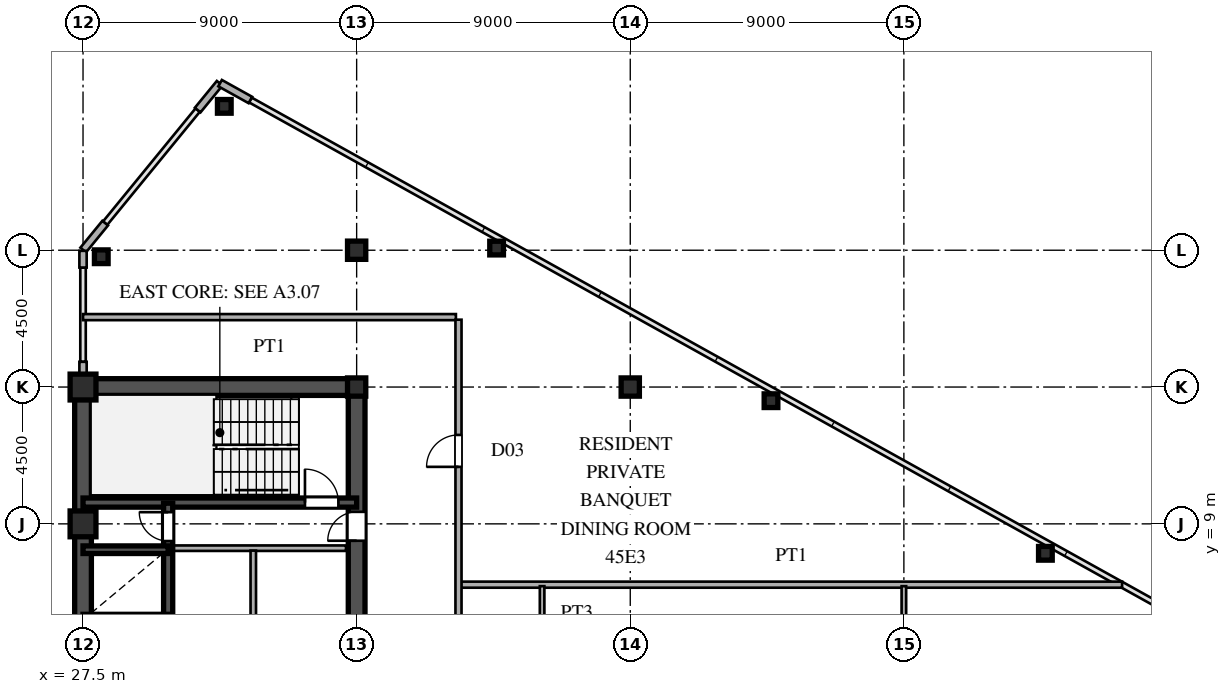
"""IFC4 building model, lengths in metres.
Left out: names, types, materials, properties, quantities, classifications, styles, units other than length and angle.
Written with IfcOpenShell. Run it as: python <this file> out.ifc"""

import sys

from ifc_helpers import new_model, si_unit, direction, frame, frame_2d, origin, origin_2d, place, context, subcontext, project, spatial, rectangle, hollow_rectangle, i_section, extrude, source, transform, mapped, element, fill, save


model = new_model("IFC4")
c1 = context("Model", 3, precision=1e-05, world=origin(), true_north=direction((0.0, 1.0)))
c2 = subcontext(c1, "Body", "Model", "MODEL_VIEW")
j1 = project(units=[si_unit("LENGTHUNIT", "METRE"), si_unit("PLANEANGLEUNIT", "RADIAN")], contexts=[c1])
p1 = place(None, origin())
s1 = spatial("IfcSite", under=j1, at=p1, CompositionType="ELEMENT")
p2 = place(p1, origin())
s2 = spatial("IfcBuilding", under=s1, at=p2, CompositionType="ELEMENT")
p3 = place(p2, frame((0.0, 0.0, 170.7)))
s3 = spatial("IfcBuildingStorey", under=s2, at=p3, CompositionType="ELEMENT", Elevation=170.7)
m1 = source(origin(), c2, "Body", "SweptSolid", [
    extrude(hollow_rectangle(XDim=0.85, YDim=0.85, WallThickness=0.036, at=origin_2d()), origin(), (0.0, 0.0, 1.0), 3.6),
])
for number, where, z_axis, x_axis in (
    (1, (27.5, 9.0, 0.0), (0.0, 0.0, 1.0), (1.0, 0.0, 0.0)),
    (2, (27.5, 13.5, 0.0), (0.0, 0.0, 1.0), (1.0, 0.0, 0.0)),
):
    element("IfcColumn", number, at=place(p3, frame(where, z_axis=z_axis, x_axis=x_axis)), inside=s3, PredefinedType="COLUMN", context=c2, shape_type="MappedRepresentation", body=[
        mapped(m1, transform((0.0, 0.0, 0.0), scale=1.0)),
    ])
m2 = source(origin(), c2, "Body", "SweptSolid", [
    extrude(i_section(OverallWidth=0.6, OverallDepth=0.6, WebThickness=0.025, FlangeThickness=0.04, at=origin_2d()), origin(), (0.0, 0.0, 1.0), 3.6),
])
for number, where, z_axis, x_axis in (
    (3, (36.5, 13.5, 0.0), (0.0, 0.0, 1.0), (1.0, 0.0, 0.0)),
    (4, (36.5, 18.0, 0.0), (0.0, 0.0, 1.0), (1.0, 0.0, 0.0)),
    (5, (45.5, 13.5, 0.0), (0.0, 0.0, 1.0), (1.0, 0.0, 0.0)),
):
    element("IfcColumn", number, at=place(p3, frame(where, z_axis=z_axis, x_axis=x_axis)), inside=s3, PredefinedType="COLUMN", context=c2, shape_type="MappedRepresentation", body=[
        mapped(m2, transform((0.0, 0.0, 0.0), scale=1.0)),
    ])
m3 = source(origin(), c2, "Body", "SweptSolid", [
    extrude(hollow_rectangle(XDim=0.45, YDim=0.45, WallThickness=0.018, at=origin_2d()), origin(), (0.0, 0.0, 1.0), 3.6),
])
for number, where, z_axis, x_axis in (
    (6, (32.147, 22.732, 0.0), (0.0, 0.0, 1.0), (1.0, 0.0, 0.0)),
    (7, (28.1, 17.786, 0.0), (0.0, 0.0, 1.0), (1.0, 0.0, 0.0)),
    (8, (41.104, 18.071, 0.0), (0.0, 0.0, 1.0), (1.0, 0.0, 0.0)),
    (9, (50.129, 13.051, 0.0), (0.0, 0.0, 1.0), (1.0, 0.0, 0.0)),
    (10, (59.155, 8.031, 0.0), (0.0, 0.0, 1.0), (1.0, 0.0, 0.0)),
):
    element("IfcColumn", number, at=place(p3, frame(where, z_axis=z_axis, x_axis=x_axis)), inside=s3, PredefinedType="COLUMN", context=c2, shape_type="MappedRepresentation", body=[
        mapped(m3, transform((0.0, 0.0, 0.0), scale=1.0)),
    ])
p4 = place(p3, frame((33.005, 22.941, 0.0), z_axis=(0.0, 0.0, 1.0), x_axis=(-0.87385402111, 0.486188389196, 0.0)))
e11 = element("IfcWall", 11, at=p4, inside=s3, PredefinedType="SOLIDWALL", context=c2, shape_type="SweptSolid", body=[
    extrude(rectangle(XDim=1.14, YDim=0.24, at=frame_2d((0.57, 0.0))), origin(), (0.0, 0.0, 1.0), 3.38),
])
for number, where, z_axis, x_axis in (
    (12, (31.994, 23.492, 0.0), (0.0, 0.0, 1.0), (-0.633, -0.774, 0.0)),
    (13, (28.228, 18.89, 0.0), (0.0, 0.0, 1.0), (-0.633, -0.774, 0.0)),
):
    element("IfcWall", number, at=place(p3, frame(where, z_axis=z_axis, x_axis=x_axis)), inside=s3, PredefinedType="SOLIDWALL", context=c2, shape_type="SweptSolid", body=[
        extrude(rectangle(XDim=1.14, YDim=0.24, at=frame_2d((0.57, 0.0))), origin(), (0.0, 0.0, 1.0), 3.38),
    ])
p5 = place(p3, frame((27.5, 13.78, 0.0), z_axis=(0.0, 0.0, 1.0), x_axis=(0.0, 1.0, 0.0)))
e14 = element("IfcWall", 14, at=p5, inside=s3, PredefinedType="SOLIDWALL", context=c2, shape_type="SweptSolid", body=[
    extrude(rectangle(XDim=0.55, YDim=0.24, at=frame_2d((0.275, 0.0))), origin(), (0.0, 0.0, 1.0), 2.88),
])
p6 = place(p3, frame((27.5, 17.43, 0.0), z_axis=(0.0, 0.0, 1.0), x_axis=(0.0, 1.0, 0.0)))
e15 = element("IfcWall", 15, at=p6, inside=s3, PredefinedType="SOLIDWALL", context=c2, shape_type="SweptSolid", body=[
    extrude(rectangle(XDim=0.55, YDim=0.24, at=frame_2d((0.275, 0.0))), origin(), (0.0, 0.0, 1.0), 3.38),
])
p7 = place(p3, frame((27.5, 1.3, 0.0), z_axis=(0.0, 0.0, 1.0), x_axis=(0.0, 1.0, 0.0)))
e16 = element("IfcWall", 16, at=p7, inside=s3, PredefinedType="SHEAR", context=c2, shape_type="SweptSolid", body=[
    extrude(rectangle(XDim=12.2, YDim=0.55, at=frame_2d((6.1, 0.0))), origin(), (0.0, 0.0, 1.0), 3.38),
])
p8 = place(p3, frame((27.5, 13.5, 0.0), z_axis=(0.0, 0.0, 1.0), x_axis=(1.0, 0.0, 0.0)))
e17 = element("IfcWall", 17, at=p8, inside=s3, PredefinedType="SHEAR", context=c2, shape_type="SweptSolid", body=[
    extrude(rectangle(XDim=9.0, YDim=0.55, at=frame_2d((4.5, 0.0))), origin(), (0.0, 0.0, 1.0), 3.38),
])
p9 = place(p3, frame((36.5, 8.2, 0.0), z_axis=(0.0, 0.0, 1.0), x_axis=(0.0, 1.0, 0.0)))
e18 = element("IfcWall", 18, at=p9, inside=s3, PredefinedType="SHEAR", context=c2, shape_type="SweptSolid", body=[
    extrude(rectangle(XDim=5.45, YDim=0.55, at=frame_2d((2.725, 0.0))), origin(), (0.0, 0.0, 1.0), 3.38),
])
p10 = place(p9, frame((0.245, 0.0, 0.0)))
e19 = element("IfcOpeningElement", 19, at=p10, cuts=e18, PredefinedType="OPENING", context=c2, shape_type="SweptSolid", body=[
    extrude(rectangle(XDim=0.95, YDim=2.15, at=frame_2d((0.475, 1.075))), frame((0.0, 0.285, 0.0), z_axis=(0.0, -1.0, 0.0), x_axis=(1.0, 0.0, 0.0)), (0.0, 0.0, 1.0), 0.57),
])
p11 = place(p3, frame((36.5, 1.3, 0.0), z_axis=(0.0, 0.0, 1.0), x_axis=(0.0, 1.0, 0.0)))
e20 = element("IfcWall", 20, at=p11, inside=s3, PredefinedType="SHEAR", context=c2, shape_type="SweptSolid", body=[
    extrude(rectangle(XDim=6.9, YDim=0.55, at=frame_2d((3.45, 0.0))), origin(), (0.0, 0.0, 1.0), 3.38),
])
p12 = place(p11, frame((2.975, 0.0, 0.0)))
e21 = element("IfcOpeningElement", 21, at=p12, cuts=e20, PredefinedType="OPENING", context=c2, shape_type="SweptSolid", body=[
    extrude(rectangle(XDim=0.95, YDim=2.15, at=frame_2d((0.475, 1.075))), frame((0.0, 0.285, 0.0), z_axis=(0.0, -1.0, 0.0), x_axis=(1.0, 0.0, 0.0)), (0.0, 0.0, 1.0), 0.57),
])
p13 = place(p3, frame((27.5, 9.7, 0.0), z_axis=(0.0, 0.0, 1.0), x_axis=(1.0, 0.0, 0.0)))
e22 = element("IfcWall", 22, at=p13, inside=s3, PredefinedType="SHEAR", context=c2, shape_type="SweptSolid", body=[
    extrude(rectangle(XDim=9.0, YDim=0.3, at=frame_2d((4.5, 0.0))), origin(), (0.0, 0.0, 1.0), 3.38),
])
p14 = place(p13, frame((7.3, 0.0, 0.0)))
e23 = element("IfcOpeningElement", 23, at=p14, cuts=e22, PredefinedType="OPENING", context=c2, shape_type="SweptSolid", body=[
    extrude(rectangle(XDim=1.1, YDim=2.2, at=frame_2d((0.55, 1.1))), frame((0.0, 0.16, 0.0), z_axis=(0.0, -1.0, 0.0), x_axis=(1.0, 0.0, 0.0)), (0.0, 0.0, 1.0), 0.32),
])
for number, where, z_axis, x_axis in (
    (24, (27.5, 5.9, 0.0), (0.0, 0.0, 1.0), (1.0, 0.0, 0.0)),
    (25, (27.5, 8.15, 0.0), (0.0, 0.0, 1.0), (1.0, 0.0, 0.0)),
):
    element("IfcWall", number, at=place(p3, frame(where, z_axis=z_axis, x_axis=x_axis)), inside=s3, PredefinedType="SHEAR", context=c2, shape_type="SweptSolid", body=[
        extrude(rectangle(XDim=2.8, YDim=0.25, at=frame_2d((1.4, 0.0))), origin(), (0.0, 0.0, 1.0), 3.38),
    ])
p15 = place(p3, frame((30.3, 5.9, 0.0), z_axis=(0.0, 0.0, 1.0), x_axis=(0.0, 1.0, 0.0)))
e26 = element("IfcWall", 26, at=p15, inside=s3, PredefinedType="SHEAR", context=c2, shape_type="SweptSolid", body=[
    extrude(rectangle(XDim=2.25, YDim=0.3, at=frame_2d((1.125, 0.0))), origin(), (0.0, 0.0, 1.0), 3.38),
])
p16 = place(p3, frame((30.3, 8.15, 0.0), z_axis=(0.0, 0.0, 1.0), x_axis=(0.0, 1.0, 0.0)))
e27 = element("IfcWall", 27, at=p16, inside=s3, PredefinedType="SHEAR", context=c2, shape_type="SweptSolid", body=[
    extrude(rectangle(XDim=1.53, YDim=0.3, at=frame_2d((0.765, 0.0))), origin(), (0.0, 0.0, 1.0), 3.38),
])
p17 = place(p16, frame((0.285, 0.0, 0.0)))
e28 = element("IfcOpeningElement", 28, at=p17, cuts=e27, PredefinedType="OPENING", context=c2, shape_type="SweptSolid", body=[
    extrude(rectangle(XDim=0.95, YDim=2.15, at=frame_2d((0.475, 1.075))), frame((0.0, 0.16, 0.0), z_axis=(0.0, -1.0, 0.0), x_axis=(1.0, 0.0, 0.0)), (0.0, 0.0, 1.0), 0.32),
])
p18 = place(p3, frame((30.45, 8.2, 0.0), z_axis=(0.0, 0.0, 1.0), x_axis=(1.0, 0.0, 0.0)))
e29 = element("IfcWall", 29, at=p18, inside=s3, PredefinedType="PARTITIONING", context=c2, shape_type="SweptSolid", body=[
    extrude(rectangle(XDim=5.7, YDim=0.18, at=frame_2d((2.85, 0.0))), origin(), (0.0, 0.0, 1.0), 3.38),
])
p19 = place(p3, frame((33.1, 1.38, 0.0), z_axis=(0.0, 0.0, 1.0), x_axis=(0.0, 1.0, 0.0)))
e30 = element("IfcWall", 30, at=p19, inside=s3, PredefinedType="PARTITIONING", context=c2, shape_type="SweptSolid", body=[
    extrude(rectangle(XDim=6.74, YDim=0.18, at=frame_2d((3.37, 0.0))), origin(), (0.0, 0.0, 1.0), 3.38),
])
p20 = place(p3, frame((39.93, 7.0, 0.0), z_axis=(0.0, 0.0, 1.0), x_axis=(1.0, 0.0, 0.0)))
e31 = element("IfcWall", 31, at=p20, inside=s3, PredefinedType="PARTITIONING", context=c2, shape_type="SweptSolid", body=[
    extrude(rectangle(XDim=21.748, YDim=0.2, at=frame_2d((10.874, 0.0))), origin(), (0.0, 0.0, 1.0), 3.38),
])
p21 = place(p3, frame((27.5, 15.8, 0.0), z_axis=(0.0, 0.0, 1.0), x_axis=(1.0, 0.0, 0.0)))
e32 = element("IfcWall", 32, at=p21, inside=s3, PredefinedType="PARTITIONING", context=c2, shape_type="SweptSolid", body=[
    extrude(rectangle(XDim=12.265, YDim=0.2, at=frame_2d((6.132, 0.0))), origin(), (0.0, 0.0, 1.0), 3.38),
])
p22 = place(p3, frame((39.85, -15.715, 0.0), z_axis=(0.0, 0.0, 1.0), x_axis=(0.0, 1.0, 0.0)))
e33 = element("IfcWall", 33, at=p22, inside=s3, PredefinedType="PARTITIONING", context=c2, shape_type="SweptSolid", body=[
    extrude(rectangle(XDim=31.43, YDim=0.2, at=frame_2d((15.715, 0.0))), origin(), (0.0, 0.0, 1.0), 3.38),
])
p23 = place(p22, frame((6.792, 0.0, 0.0)))
e34 = element("IfcOpeningElement", 34, at=p23, cuts=e33, PredefinedType="OPENING", context=c2, shape_type="SweptSolid", body=[
    extrude(rectangle(XDim=1.05, YDim=2.25, at=frame_2d((0.525, 1.125))), frame((0.0, 0.11, 0.0), z_axis=(0.0, -1.0, 0.0), x_axis=(1.0, 0.0, 0.0)), (0.0, 0.0, 1.0), 0.22),
])
p24 = place(p22, frame((14.98, 0.0, 0.0)))
e35 = element("IfcOpeningElement", 35, at=p24, cuts=e33, PredefinedType="OPENING", context=c2, shape_type="SweptSolid", body=[
    extrude(rectangle(XDim=1.05, YDim=2.25, at=frame_2d((0.525, 1.125))), frame((0.0, 0.11, 0.0), z_axis=(0.0, -1.0, 0.0), x_axis=(1.0, 0.0, 0.0)), (0.0, 0.0, 1.0), 0.22),
])
p25 = place(p22, frame((26.59, 0.0, 0.0)))
e36 = element("IfcOpeningElement", 36, at=p25, cuts=e33, PredefinedType="OPENING", context=c2, shape_type="SweptSolid", body=[
    extrude(rectangle(XDim=1.05, YDim=2.25, at=frame_2d((0.525, 1.125))), frame((0.0, 0.11, 0.0), z_axis=(0.0, -1.0, 0.0), x_axis=(1.0, 0.0, 0.0)), (0.0, 0.0, 1.0), 0.22),
])
p26 = place(p3, frame((42.6, 2.852, 0.0), z_axis=(0.0, 0.0, 1.0), x_axis=(0.0, 1.0, 0.0)))
e37 = element("IfcWall", 37, at=p26, inside=s3, PredefinedType="PARTITIONING", context=c2, shape_type="SweptSolid", body=[
    extrude(rectangle(XDim=4.098, YDim=0.15, at=frame_2d((2.049, 0.0))), origin(), (0.0, 0.0, 1.0), 3.38),
])
p27 = place(p3, frame((54.5, -10.485, 0.0), z_axis=(0.0, 0.0, 1.0), x_axis=(0.0, 1.0, 0.0)))
e38 = element("IfcWall", 38, at=p27, inside=s3, PredefinedType="PARTITIONING", context=c2, shape_type="SweptSolid", body=[
    extrude(rectangle(XDim=17.435, YDim=0.15, at=frame_2d((8.718, 0.0))), origin(), (0.0, 0.0, 1.0), 2.78),
])
p28 = place(p27, frame((1.242, 0.0, 0.0)))
e39 = element("IfcOpeningElement", 39, at=p28, cuts=e38, PredefinedType="OPENING", context=c2, shape_type="SweptSolid", body=[
    extrude(rectangle(XDim=0.95, YDim=2.15, at=frame_2d((0.475, 1.075))), frame((0.0, 0.085, 0.0), z_axis=(0.0, -1.0, 0.0), x_axis=(1.0, 0.0, 0.0)), (0.0, 0.0, 1.0), 0.17),
])
p29 = place(p27, frame((10.01, 0.0, 0.0)))
e40 = element("IfcOpeningElement", 40, at=p29, cuts=e38, PredefinedType="OPENING", context=c2, shape_type="SweptSolid", body=[
    extrude(rectangle(XDim=0.95, YDim=2.15, at=frame_2d((0.475, 1.075))), frame((0.0, 0.085, 0.0), z_axis=(0.0, -1.0, 0.0), x_axis=(1.0, 0.0, 0.0)), (0.0, 0.0, 1.0), 0.17),
])
m4 = source(origin(), c2, "Body", "SweptSolid", [
    extrude(rectangle(XDim=0.95, YDim=2.15, at=frame_2d((0.475, 1.075))), frame((0.0, 0.025, 0.0), z_axis=(0.0, -1.0, 0.0), x_axis=(1.0, 0.0, 0.0)), (0.0, 0.0, 1.0), 0.05),
])
p30 = place(p10, origin())
e41 = element("IfcDoor", 41, at=p30, inside=s3, OperationType="SINGLE_SWING_LEFT", PredefinedType="DOOR", context=c2, shape_type="MappedRepresentation", body=[
    mapped(m4, transform((0.0, 0.0, 0.0), scale=1.0)),
])
fill(e19, e41)
m5 = source(origin(), c2, "Body", "SweptSolid", [
    extrude(rectangle(XDim=1.1, YDim=2.2, at=frame_2d((0.55, 1.1))), frame((0.0, 0.025, 0.0), z_axis=(0.0, -1.0, 0.0), x_axis=(1.0, 0.0, 0.0)), (0.0, 0.0, 1.0), 0.05),
])
p31 = place(p14, origin())
e42 = element("IfcDoor", 42, at=p31, inside=s3, OperationType="SINGLE_SWING_LEFT", PredefinedType="DOOR", context=c2, shape_type="MappedRepresentation", body=[
    mapped(m5, transform((0.0, 0.0, 0.0), scale=1.0)),
])
fill(e23, e42)
p32 = place(p17, origin())
e43 = element("IfcDoor", 43, at=p32, inside=s3, OperationType="SINGLE_SWING_RIGHT", PredefinedType="DOOR", context=c2, shape_type="MappedRepresentation", body=[
    mapped(m4, transform((0.0, 0.0, 0.0), scale=1.0)),
])
fill(e28, e43)
m6 = source(origin(), c2, "Body", "SweptSolid", [
    extrude(rectangle(XDim=1.05, YDim=2.25, at=frame_2d((0.525, 1.125))), frame((0.0, 0.025, 0.0), z_axis=(0.0, -1.0, 0.0), x_axis=(1.0, 0.0, 0.0)), (0.0, 0.0, 1.0), 0.05),
])
p33 = place(p25, origin())
e44 = element("IfcDoor", 44, at=p33, inside=s3, OperationType="SINGLE_SWING_LEFT", PredefinedType="DOOR", context=c2, shape_type="MappedRepresentation", body=[
    mapped(m6, transform((0.0, 0.0, 0.0), scale=1.0)),
])
fill(e36, e44)
save(model, sys.argv[1])
